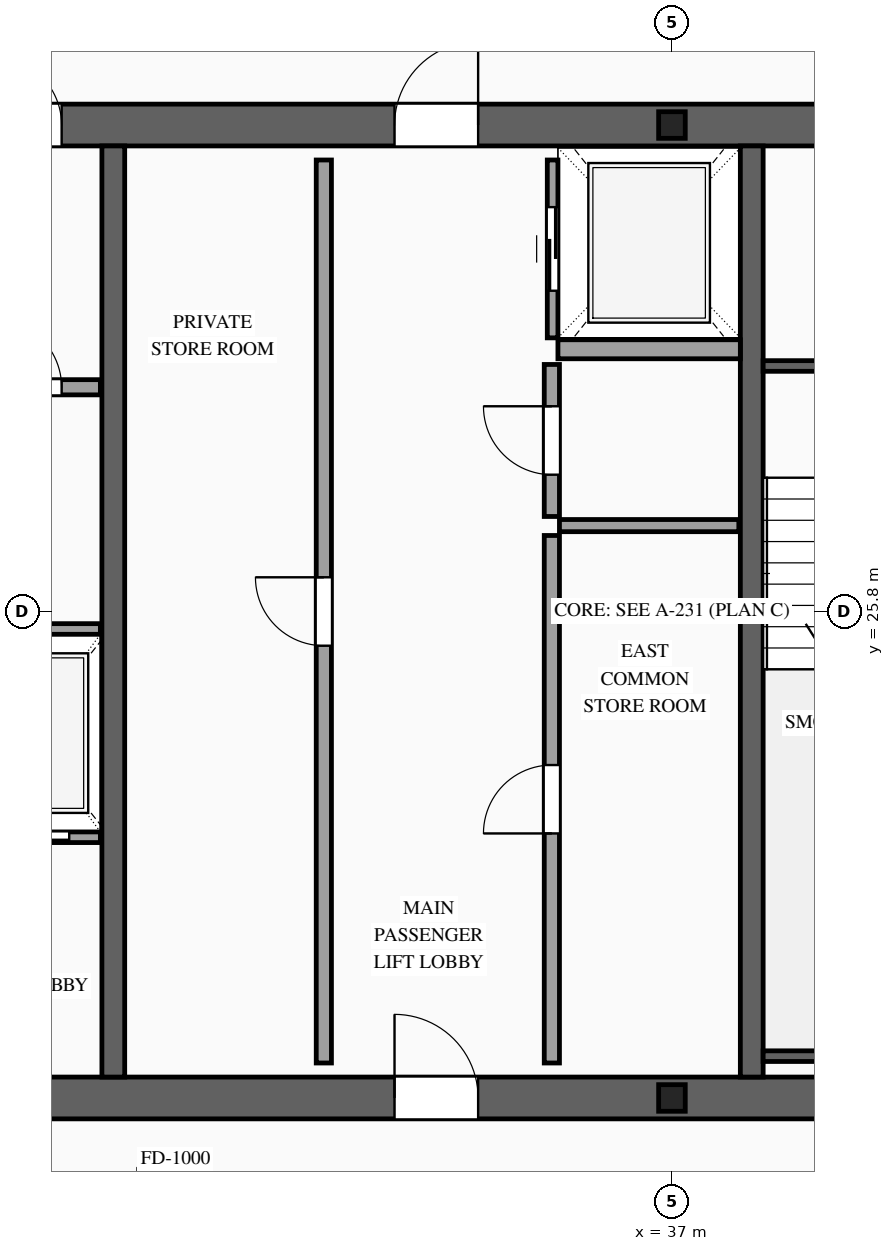
"""IFC4 building model, lengths in metres.
Left out: names, types, materials, properties, quantities, classifications, styles, units other than length and angle.
Written with IfcOpenShell. Run it as: python <this file> out.ifc"""

import sys

from ifc_helpers import new_model, si_unit, direction, frame, frame_2d, origin, origin_2d, place, context, subcontext, project, spatial, rectangle, i_section, extrude, source, transform, mapped, element, fill, save


model = new_model("IFC4")
c1 = context("Model", 3, precision=1e-05, world=origin(), true_north=direction((0.0, 1.0)))
c2 = subcontext(c1, "Body", "Model", "MODEL_VIEW")
j1 = project(units=[si_unit("LENGTHUNIT", "METRE"), si_unit("PLANEANGLEUNIT", "RADIAN")], contexts=[c1])
p1 = place(None, origin())
s1 = spatial("IfcSite", under=j1, at=p1, CompositionType="ELEMENT")
p2 = place(p1, origin())
s2 = spatial("IfcBuilding", under=s1, at=p2, CompositionType="ELEMENT")
p3 = place(p2, frame((0.0, 0.0, 282.1)))
s3 = spatial("IfcBuildingStorey", under=s2, at=p3, CompositionType="ELEMENT", Elevation=282.1)
p4 = place(p3, frame((23.525, 19.4, 0.0), z_axis=(0.0, 0.0, 1.0), x_axis=(1.0, 0.0, 0.0)))
e1 = element("IfcWall", 1, at=p4, inside=s3, PredefinedType="SHEAR", context=c2, shape_type="SweptSolid", body=[
    extrude(rectangle(XDim=26.95, YDim=0.55, at=frame_2d((13.475, 0.0))), origin(), (0.0, 0.0, 1.0), 3.5),
])
p5 = place(p4, frame((1.925, 0.0, 0.0)))
e2 = element("IfcOpeningElement", 2, at=p5, cuts=e1, PredefinedType="OPENING", context=c2, shape_type="SweptSolid", body=[
    extrude(rectangle(XDim=1.1, YDim=2.2, at=frame_2d((0.55, 1.1))), frame((0.0, 0.29, 0.0), z_axis=(0.0, -1.0, 0.0), x_axis=(1.0, 0.0, 0.0)), (0.0, 0.0, 1.0), 0.58),
])
p6 = place(p4, frame((9.825, 0.0, 0.0)))
e3 = element("IfcOpeningElement", 3, at=p6, cuts=e1, PredefinedType="OPENING", context=c2, shape_type="SweptSolid", body=[
    extrude(rectangle(XDim=1.1, YDim=2.2, at=frame_2d((0.55, 1.1))), frame((0.0, 0.29, 0.0), z_axis=(0.0, -1.0, 0.0), x_axis=(1.0, 0.0, 0.0)), (0.0, 0.0, 1.0), 0.58),
])
p7 = place(p4, frame((23.025, 0.0, 0.0)))
e4 = element("IfcOpeningElement", 4, at=p7, cuts=e1, PredefinedType="OPENING", context=c2, shape_type="SweptSolid", body=[
    extrude(rectangle(XDim=1.1, YDim=2.2, at=frame_2d((0.55, 1.1))), frame((0.0, 0.29, 0.0), z_axis=(0.0, -1.0, 0.0), x_axis=(1.0, 0.0, 0.0)), (0.0, 0.0, 1.0), 0.58),
])
p8 = place(p4, frame((19.645, 0.0, 0.0)))
e5 = element("IfcOpeningElement", 5, at=p8, cuts=e1, PredefinedType="OPENING", context=c2, shape_type="SweptSolid", body=[
    extrude(rectangle(XDim=0.9, YDim=2.15, at=frame_2d((0.45, 1.075))), frame((0.0, 0.29, 0.0), z_axis=(0.0, -1.0, 0.0), x_axis=(1.0, 0.0, 0.0)), (0.0, 0.0, 1.0), 0.58),
])
p9 = place(p4, frame((18.205, 0.0, 0.0)))
e6 = element("IfcOpeningElement", 6, at=p9, cuts=e1, PredefinedType="OPENING", context=c2, shape_type="SweptSolid", body=[
    extrude(rectangle(XDim=0.9, YDim=2.15, at=frame_2d((0.45, 1.075))), frame((0.0, 0.29, 0.0), z_axis=(0.0, -1.0, 0.0), x_axis=(1.0, 0.0, 0.0)), (0.0, 0.0, 1.0), 0.58),
])
p10 = place(p3, frame((23.525, 32.2, 0.0), z_axis=(0.0, 0.0, 1.0), x_axis=(1.0, 0.0, 0.0)))
e7 = element("IfcWall", 7, at=p10, inside=s3, PredefinedType="SHEAR", context=c2, shape_type="SweptSolid", body=[
    extrude(rectangle(XDim=26.95, YDim=0.55, at=frame_2d((13.475, 0.0))), origin(), (0.0, 0.0, 1.0), 3.5),
])
p11 = place(p10, frame((4.545, 0.0, 0.0)))
e8 = element("IfcOpeningElement", 8, at=p11, cuts=e7, PredefinedType="OPENING", context=c2, shape_type="SweptSolid", body=[
    extrude(rectangle(XDim=0.9, YDim=2.15, at=frame_2d((0.45, 1.075))), frame((0.0, 0.29, 0.0), z_axis=(0.0, -1.0, 0.0), x_axis=(1.0, 0.0, 0.0)), (0.0, 0.0, 1.0), 0.58),
])
p12 = place(p10, frame((9.825, 0.0, 0.0)))
e9 = element("IfcOpeningElement", 9, at=p12, cuts=e7, PredefinedType="OPENING", context=c2, shape_type="SweptSolid", body=[
    extrude(rectangle(XDim=1.1, YDim=2.2, at=frame_2d((0.55, 1.1))), frame((0.0, 0.29, 0.0), z_axis=(0.0, -1.0, 0.0), x_axis=(1.0, 0.0, 0.0)), (0.0, 0.0, 1.0), 0.58),
])
p13 = place(p10, frame((15.675, 0.0, 0.0)))
e10 = element("IfcOpeningElement", 10, at=p13, cuts=e7, PredefinedType="OPENING", context=c2, shape_type="SweptSolid", body=[
    extrude(rectangle(XDim=1.1, YDim=2.2, at=frame_2d((0.55, 1.1))), frame((0.0, 0.29, 0.0), z_axis=(0.0, -1.0, 0.0), x_axis=(1.0, 0.0, 0.0)), (0.0, 0.0, 1.0), 0.58),
])
p14 = place(p10, frame((18.775, 0.0, 0.0)))
e11 = element("IfcOpeningElement", 11, at=p14, cuts=e7, PredefinedType="OPENING", context=c2, shape_type="SweptSolid", body=[
    extrude(rectangle(XDim=1.1, YDim=2.2, at=frame_2d((0.55, 1.1))), frame((0.0, 0.29, 0.0), z_axis=(0.0, -1.0, 0.0), x_axis=(1.0, 0.0, 0.0)), (0.0, 0.0, 1.0), 0.58),
])
m1 = source(origin(), c2, "Body", "SweptSolid", [
    extrude(rectangle(XDim=12.25, YDim=0.3, at=frame_2d((6.125, 0.0))), origin(), (0.0, 0.0, 1.0), 3.5),
])
for number, where, z_axis, x_axis in (
    (12, (29.65, 19.675, 0.0), (0.0, 0.0, 1.0), (0.0, 1.0, 0.0)),
    (13, (38.05, 19.675, 0.0), (0.0, 0.0, 1.0), (0.0, 1.0, 0.0)),
):
    element("IfcWall", number, at=place(p3, frame(where, z_axis=z_axis, x_axis=x_axis)), inside=s3, PredefinedType="SOLIDWALL", context=c2, shape_type="MappedRepresentation", body=[
        mapped(m1, transform((0.0, 0.0, 0.0), scale=1.0)),
    ])
m2 = source(origin(), c2, "Body", "SweptSolid", [
    extrude(i_section(OverallWidth=0.35, OverallDepth=0.35, WebThickness=0.012, FlangeThickness=0.019, at=origin_2d()), origin(), (0.0, 0.0, 1.0), 3.5),
])
for number, where, z_axis, x_axis in (
    (14, (37.0, 19.4, 0.0), (0.0, 0.0, 1.0), (1.0, 0.0, 0.0)),
    (15, (37.0, 32.2, 0.0), (0.0, 0.0, 1.0), (1.0, 0.0, 0.0)),
):
    element("IfcColumn", number, at=place(p3, frame(where, z_axis=z_axis, x_axis=x_axis)), inside=s3, PredefinedType="COLUMN", context=c2, shape_type="MappedRepresentation", body=[
        mapped(m2, transform((0.0, 0.0, 0.0), scale=1.0)),
    ])
p15 = place(p3, frame((27.56, 22.83, 0.0), z_axis=(0.0, 0.0, 1.0), x_axis=(1.0, 0.0, 0.0)))
e16 = element("IfcWall", 16, at=p15, inside=s3, PredefinedType="SOLIDWALL", context=c2, shape_type="SweptSolid", body=[
    extrude(rectangle(XDim=1.92, YDim=0.14, at=frame_2d((0.96, 0.0))), origin(), (0.0, 0.0, 1.0), 3.28),
])
p16 = place(p15, frame((0.41, 0.0, 0.0)))
e17 = element("IfcOpeningElement", 17, at=p16, cuts=e16, PredefinedType="OPENING", context=c2, shape_type="SweptSolid", body=[
    extrude(rectangle(XDim=1.1, YDim=2.2, at=frame_2d((0.55, 1.1))), frame((0.0, 0.085, 0.0), z_axis=(0.0, -1.0, 0.0), x_axis=(1.0, 0.0, 0.0)), (0.0, 0.0, 1.0), 0.17),
])
m3 = source(origin(), c2, "Body", "SweptSolid", [
    extrude(rectangle(XDim=1.92, YDim=0.14, at=frame_2d((0.96, 0.0))), origin(), (0.0, 0.0, 1.0), 3.28),
])
p17 = place(p3, frame((27.56, 25.57, 0.0), z_axis=(0.0, 0.0, 1.0), x_axis=(1.0, 0.0, 0.0)))
e18 = element("IfcWall", 18, at=p17, inside=s3, PredefinedType="SOLIDWALL", context=c2, shape_type="MappedRepresentation", body=[
    mapped(m3, transform((0.0, 0.0, 0.0), scale=1.0)),
])
p18 = place(p3, frame((35.43, 29.4, 0.0), z_axis=(0.0, 0.0, 1.0), x_axis=(0.0, 1.0, 0.0)))
e19 = element("IfcWall", 19, at=p18, inside=s3, PredefinedType="SOLIDWALL", context=c2, shape_type="SweptSolid", body=[
    extrude(rectangle(XDim=2.34, YDim=0.14, at=frame_2d((1.17, 0.0))), origin(), (0.0, 0.0, 1.0), 3.28),
])
p19 = place(p18, frame((0.62, 0.0, 0.0)))
e20 = element("IfcOpeningElement", 20, at=p19, cuts=e19, PredefinedType="OPENING", context=c2, shape_type="SweptSolid", body=[
    extrude(rectangle(XDim=1.1, YDim=2.2, at=frame_2d((0.55, 1.1))), frame((0.0, 0.085, 0.0), z_axis=(0.0, -1.0, 0.0), x_axis=(1.0, 0.0, 0.0)), (0.0, 0.0, 1.0), 0.17),
])
m4 = source(origin(), c2, "Body", "SweptSolid", [
    extrude(rectangle(XDim=2.4, YDim=0.25, at=frame_2d((1.2, 0.0))), origin(), (0.0, 0.0, 1.0), 3.28),
])
p20 = place(p3, frame((35.5, 29.25, 0.0), z_axis=(0.0, 0.0, 1.0), x_axis=(1.0, 0.0, 0.0)))
e21 = element("IfcWall", 21, at=p20, inside=s3, PredefinedType="SOLIDWALL", context=c2, shape_type="MappedRepresentation", body=[
    mapped(m4, transform((0.0, 0.0, 0.0), scale=1.0)),
])
p21 = place(p3, frame((38.2, 29.03, 0.0), z_axis=(0.0, 0.0, 1.0), x_axis=(1.0, 0.0, 0.0)))
e22 = element("IfcWall", 22, at=p21, inside=s3, PredefinedType="SOLIDWALL", context=c2, shape_type="SweptSolid", body=[
    extrude(rectangle(XDim=3.14, YDim=0.14, at=frame_2d((1.57, 0.0))), origin(), (0.0, 0.0, 1.0), 3.28),
])
p22 = place(p21, frame((1.02, 0.0, 0.0)))
e23 = element("IfcOpeningElement", 23, at=p22, cuts=e22, PredefinedType="OPENING", context=c2, shape_type="SweptSolid", body=[
    extrude(rectangle(XDim=1.1, YDim=2.2, at=frame_2d((0.55, 1.1))), frame((0.0, 0.085, 0.0), z_axis=(0.0, -1.0, 0.0), x_axis=(1.0, 0.0, 0.0)), (0.0, 0.0, 1.0), 0.17),
])
m5 = source(origin(), c2, "Body", "SweptSolid", [
    extrude(rectangle(XDim=3.14, YDim=0.14, at=frame_2d((1.57, 0.0))), origin(), (0.0, 0.0, 1.0), 3.28),
])
p23 = place(p3, frame((38.2, 19.95, 0.0), z_axis=(0.0, 0.0, 1.0), x_axis=(1.0, 0.0, 0.0)))
e24 = element("IfcWall", 24, at=p23, inside=s3, PredefinedType="SOLIDWALL", context=c2, shape_type="MappedRepresentation", body=[
    mapped(m5, transform((0.0, 0.0, 0.0), scale=1.0)),
])
p24 = place(p3, frame((27.56, 28.75, 0.0), z_axis=(0.0, 0.0, 1.0), x_axis=(1.0, 0.0, 0.0)))
e25 = element("IfcWall", 25, at=p24, inside=s3, PredefinedType="PARTITIONING", context=c2, shape_type="SweptSolid", body=[
    extrude(rectangle(XDim=1.92, YDim=0.2, at=frame_2d((0.96, 0.0))), origin(), (0.0, 0.0, 1.0), 3.28),
])
p25 = place(p24, frame((0.51, 0.0, 0.0)))
e26 = element("IfcOpeningElement", 26, at=p25, cuts=e25, PredefinedType="OPENING", context=c2, shape_type="SweptSolid", body=[
    extrude(rectangle(XDim=0.9, YDim=2.15, at=frame_2d((0.45, 1.075))), frame((0.0, 0.115, 0.0), z_axis=(0.0, -1.0, 0.0), x_axis=(1.0, 0.0, 0.0)), (0.0, 0.0, 1.0), 0.23),
])
p26 = place(p3, frame((32.42, 19.86, 0.0), z_axis=(0.0, 0.0, 1.0), x_axis=(0.0, 1.0, 0.0)))
e27 = element("IfcWall", 27, at=p26, inside=s3, PredefinedType="PARTITIONING", context=c2, shape_type="SweptSolid", body=[
    extrude(rectangle(XDim=11.88, YDim=0.2, at=frame_2d((5.94, 0.0))), origin(), (0.0, 0.0, 1.0), 3.28),
])
p27 = place(p26, frame((5.49, 0.0, 0.0)))
e28 = element("IfcOpeningElement", 28, at=p27, cuts=e27, PredefinedType="OPENING", context=c2, shape_type="SweptSolid", body=[
    extrude(rectangle(XDim=0.9, YDim=2.15, at=frame_2d((0.45, 1.075))), frame((0.0, 0.115, 0.0), z_axis=(0.0, -1.0, 0.0), x_axis=(1.0, 0.0, 0.0)), (0.0, 0.0, 1.0), 0.23),
])
p28 = place(p3, frame((35.42, 19.86, 0.0), z_axis=(0.0, 0.0, 1.0), x_axis=(0.0, 1.0, 0.0)))
e29 = element("IfcWall", 29, at=p28, inside=s3, PredefinedType="PARTITIONING", context=c2, shape_type="SweptSolid", body=[
    extrude(rectangle(XDim=6.94, YDim=0.2, at=frame_2d((3.47, 0.0))), origin(), (0.0, 0.0, 1.0), 3.28),
])
p29 = place(p28, frame((3.02, 0.0, 0.0)))
e30 = element("IfcOpeningElement", 30, at=p29, cuts=e29, PredefinedType="OPENING", context=c2, shape_type="SweptSolid", body=[
    extrude(rectangle(XDim=0.9, YDim=2.15, at=frame_2d((0.45, 1.075))), frame((0.0, 0.115, 0.0), z_axis=(0.0, -1.0, 0.0), x_axis=(1.0, 0.0, 0.0)), (0.0, 0.0, 1.0), 0.23),
])
p30 = place(p3, frame((35.42, 27.05, 0.0), z_axis=(0.0, 0.0, 1.0), x_axis=(0.0, 1.0, 0.0)))
e31 = element("IfcWall", 31, at=p30, inside=s3, PredefinedType="PARTITIONING", context=c2, shape_type="SweptSolid", body=[
    extrude(rectangle(XDim=2.0, YDim=0.2, at=frame_2d((1.0, 0.0))), origin(), (0.0, 0.0, 1.0), 3.28),
])
p31 = place(p30, frame((0.55, 0.0, 0.0)))
e32 = element("IfcOpeningElement", 32, at=p31, cuts=e31, PredefinedType="OPENING", context=c2, shape_type="SweptSolid", body=[
    extrude(rectangle(XDim=0.9, YDim=2.15, at=frame_2d((0.45, 1.075))), frame((0.0, 0.115, 0.0), z_axis=(0.0, -1.0, 0.0), x_axis=(1.0, 0.0, 0.0)), (0.0, 0.0, 1.0), 0.23),
])
m6 = source(origin(), c2, "Body", "SweptSolid", [
    extrude(rectangle(XDim=2.36, YDim=0.16, at=frame_2d((1.18, 0.0))), origin(), (0.0, 0.0, 1.0), 3.28),
])
p32 = place(p3, frame((35.52, 26.93, 0.0), z_axis=(0.0, 0.0, 1.0), x_axis=(1.0, 0.0, 0.0)))
e33 = element("IfcWall", 33, at=p32, inside=s3, PredefinedType="PARTITIONING", context=c2, shape_type="MappedRepresentation", body=[
    mapped(m6, transform((0.0, 0.0, 0.0), scale=1.0)),
])
m7 = source(origin(), c2, "Body", "SweptSolid", [
    extrude(rectangle(XDim=1.1, YDim=2.2, at=frame_2d((0.55, 1.1))), frame((0.0, 0.025, 0.0), z_axis=(0.0, -1.0, 0.0), x_axis=(1.0, 0.0, 0.0)), (0.0, 0.0, 1.0), 0.05),
])
p33 = place(p16, origin())
e34 = element("IfcDoor", 34, at=p33, inside=s3, OperationType="SLIDING_TO_LEFT", PredefinedType="DOOR", context=c2, shape_type="MappedRepresentation", body=[
    mapped(m7, transform((0.0, 0.0, 0.0), scale=1.0)),
])
fill(e17, e34)
p34 = place(p19, origin())
e35 = element("IfcDoor", 35, at=p34, inside=s3, OperationType="SLIDING_TO_RIGHT", PredefinedType="DOOR", context=c2, shape_type="MappedRepresentation", body=[
    mapped(m7, transform((0.0, 0.0, 0.0), scale=1.0)),
])
fill(e20, e35)
m8 = source(origin(), c2, "Body", "SweptSolid", [
    extrude(rectangle(XDim=1.1, YDim=2.2, at=frame_2d((0.55, 1.1))), frame((0.0, 0.025, 0.0), z_axis=(0.0, -1.0, 0.0), x_axis=(1.0, 0.0, 0.0)), (0.0, 0.0, 1.0), 0.05),
])
p35 = place(p6, origin())
e36 = element("IfcDoor", 36, at=p35, inside=s3, OperationType="SINGLE_SWING_LEFT", PredefinedType="DOOR", context=c2, shape_type="MappedRepresentation", body=[
    mapped(m8, transform((0.0, 0.0, 0.0), scale=1.0)),
])
fill(e3, e36)
m9 = source(origin(), c2, "Body", "SweptSolid", [
    extrude(rectangle(XDim=0.9, YDim=2.15, at=frame_2d((0.45, 1.075))), frame((0.0, 0.025, 0.0), z_axis=(0.0, -1.0, 0.0), x_axis=(1.0, 0.0, 0.0)), (0.0, 0.0, 1.0), 0.05),
])
p36 = place(p11, origin())
e37 = element("IfcDoor", 37, at=p36, inside=s3, OperationType="SINGLE_SWING_LEFT", PredefinedType="DOOR", context=c2, shape_type="MappedRepresentation", body=[
    mapped(m9, transform((0.0, 0.0, 0.0), scale=1.0)),
])
fill(e8, e37)
p37 = place(p12, origin())
e38 = element("IfcDoor", 38, at=p37, inside=s3, OperationType="SINGLE_SWING_RIGHT", PredefinedType="DOOR", context=c2, shape_type="MappedRepresentation", body=[
    mapped(m8, transform((0.0, 0.0, 0.0), scale=1.0)),
])
fill(e9, e38)
p38 = place(p25, origin())
e39 = element("IfcDoor", 39, at=p38, inside=s3, OperationType="SINGLE_SWING_LEFT", PredefinedType="DOOR", context=c2, shape_type="MappedRepresentation", body=[
    mapped(m9, transform((0.0, 0.0, 0.0), scale=1.0)),
])
fill(e26, e39)
p39 = place(p27, origin())
e40 = element("IfcDoor", 40, at=p39, inside=s3, OperationType="SINGLE_SWING_RIGHT", PredefinedType="DOOR", context=c2, shape_type="MappedRepresentation", body=[
    mapped(m9, transform((0.0, 0.0, 0.0), scale=1.0)),
])
fill(e28, e40)
p40 = place(p29, origin())
e41 = element("IfcDoor", 41, at=p40, inside=s3, OperationType="SINGLE_SWING_LEFT", PredefinedType="DOOR", context=c2, shape_type="MappedRepresentation", body=[
    mapped(m9, transform((0.0, 0.0, 0.0), scale=1.0)),
])
fill(e30, e41)
p41 = place(p31, origin())
e42 = element("IfcDoor", 42, at=p41, inside=s3, OperationType="SINGLE_SWING_RIGHT", PredefinedType="DOOR", context=c2, shape_type="MappedRepresentation", body=[
    mapped(m9, transform((0.0, 0.0, 0.0), scale=1.0)),
])
fill(e32, e42)
save(model, sys.argv[1])
